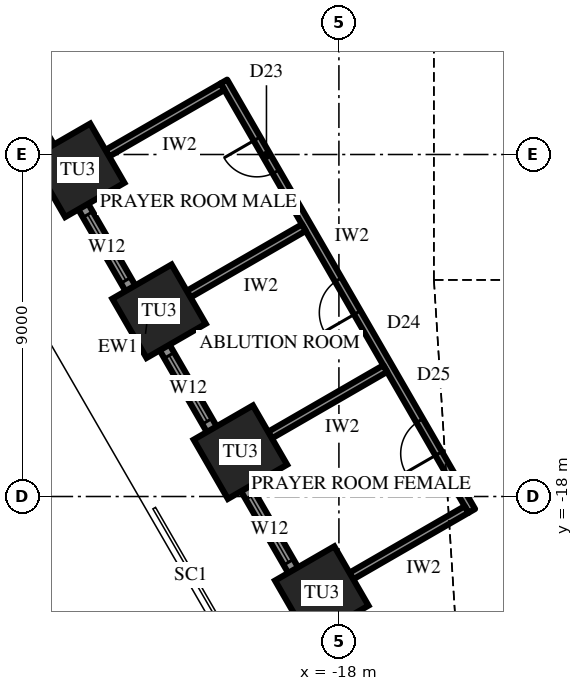
"""IFC4 building model, lengths in metres.
Left out: names, types, materials, properties, quantities, classifications, styles, units other than length and angle.
Written with IfcOpenShell. Run it as: python <this file> out.ifc"""

import sys

from ifc_helpers import new_model, si_unit, direction, frame, frame_2d, origin, origin_2d, place, context, subcontext, project, spatial, rectangle, hollow_rectangle, extrude, element, fill, save


model = new_model("IFC4")
c1 = context("Model", 3, precision=1e-05, world=origin(), true_north=direction((0.0, 1.0)))
c2 = subcontext(c1, "Body", "Model", "MODEL_VIEW")
j1 = project(units=[si_unit("LENGTHUNIT", "METRE"), si_unit("PLANEANGLEUNIT", "RADIAN")], contexts=[c1])
p1 = place(None, origin())
s1 = spatial("IfcSite", under=j1, at=p1, CompositionType="ELEMENT")
p2 = place(p1, origin())
s2 = spatial("IfcBuilding", under=s1, at=p2, CompositionType="ELEMENT")
p3 = place(p2, frame((0.0, 0.0, 311.5)))
s3 = spatial("IfcBuildingStorey", under=s2, at=p3, CompositionType="ELEMENT", Elevation=311.5)
for number, where, z_axis, x_axis in (
    (1, (-24.874, -9.417, 0.0), (0.0, 0.0, 1.0), (0.5, -0.866, 0.0)),
    (2, (-22.733, -13.125, 0.0), (0.0, 0.0, 1.0), (0.5, -0.866, 0.0)),
    (3, (-20.592, -16.833, 0.0), (0.0, 0.0, 1.0), (0.5, -0.866, 0.0)),
    (4, (-18.451, -20.542, 0.0), (0.0, 0.0, 1.0), (0.5, -0.866, 0.0)),
):
    element("IfcColumn", number, at=place(p3, frame(where, z_axis=z_axis, x_axis=x_axis)), inside=s3, PredefinedType="COLUMN", context=c2, shape_type="SweptSolid", body=[
        extrude(hollow_rectangle(XDim=1.8, YDim=1.8, WallThickness=0.1, at=origin_2d()), origin(), (0.0, 0.0, 1.0), 4.2),
    ])
p4 = place(p3, frame((-29.459, -2.175, 0.0), z_axis=(0.0, 0.0, 1.0), x_axis=(0.499997191038, -0.866027025533, 0.0)))
e5 = element("IfcWall", 5, at=p4, inside=s3, PredefinedType="SOLIDWALL", context=c2, shape_type="SweptSolid", body=[
    extrude(rectangle(XDim=25.692, YDim=0.3, at=frame_2d((12.846, 0.0))), origin(), (0.0, 0.0, 1.0), 2.0),
])
p5 = place(p4, frame((1.141, 0.0, 0.6)))
e6 = element("IfcOpeningElement", 6, at=p5, cuts=e5, PredefinedType="OPENING", context=c2, shape_type="SweptSolid", body=[
    extrude(rectangle(XDim=2.0, YDim=1.15, at=frame_2d((1.0, 0.575))), frame((0.0, 0.16, 0.0), z_axis=(0.0, -1.0, 0.0), x_axis=(1.0, 0.0, 0.0)), (0.0, 0.0, 1.0), 0.32),
])
p6 = place(p4, frame((5.423, 0.0, 0.6)))
e7 = element("IfcOpeningElement", 7, at=p6, cuts=e5, PredefinedType="OPENING", context=c2, shape_type="SweptSolid", body=[
    extrude(rectangle(XDim=2.0, YDim=1.15, at=frame_2d((1.0, 0.575))), frame((0.0, 0.16, 0.0), z_axis=(0.0, -1.0, 0.0), x_axis=(1.0, 0.0, 0.0)), (0.0, 0.0, 1.0), 0.32),
])
p7 = place(p4, frame((9.705, 0.0, 0.6)))
e8 = element("IfcOpeningElement", 8, at=p7, cuts=e5, PredefinedType="OPENING", context=c2, shape_type="SweptSolid", body=[
    extrude(rectangle(XDim=2.0, YDim=1.15, at=frame_2d((1.0, 0.575))), frame((0.0, 0.16, 0.0), z_axis=(0.0, -1.0, 0.0), x_axis=(1.0, 0.0, 0.0)), (0.0, 0.0, 1.0), 0.32),
])
p8 = place(p4, frame((13.987, 0.0, 0.6)))
e9 = element("IfcOpeningElement", 9, at=p8, cuts=e5, PredefinedType="OPENING", context=c2, shape_type="SweptSolid", body=[
    extrude(rectangle(XDim=2.0, YDim=1.15, at=frame_2d((1.0, 0.575))), frame((0.0, 0.16, 0.0), z_axis=(0.0, -1.0, 0.0), x_axis=(1.0, 0.0, 0.0)), (0.0, 0.0, 1.0), 0.32),
])
p9 = place(p4, frame((18.269, 0.0, 0.6)))
e10 = element("IfcOpeningElement", 10, at=p9, cuts=e5, PredefinedType="OPENING", context=c2, shape_type="SweptSolid", body=[
    extrude(rectangle(XDim=2.0, YDim=1.15, at=frame_2d((1.0, 0.575))), frame((0.0, 0.16, 0.0), z_axis=(0.0, -1.0, 0.0), x_axis=(1.0, 0.0, 0.0)), (0.0, 0.0, 1.0), 0.32),
])
p10 = place(p4, frame((22.551, 0.0, 0.6)))
e11 = element("IfcOpeningElement", 11, at=p10, cuts=e5, PredefinedType="OPENING", context=c2, shape_type="SweptSolid", body=[
    extrude(rectangle(XDim=2.0, YDim=1.15, at=frame_2d((1.0, 0.575))), frame((0.0, 0.16, 0.0), z_axis=(0.0, -1.0, 0.0), x_axis=(1.0, 0.0, 0.0)), (0.0, 0.0, 1.0), 0.32),
])
p11 = place(p3, frame((-21.027, -7.08, 0.0), z_axis=(0.0, 0.0, 1.0), x_axis=(0.499999460936, -0.866025715013, 0.0)))
e12 = element("IfcWall", 12, at=p11, inside=s3, PredefinedType="PARTITIONING", context=c2, shape_type="SweptSolid", body=[
    extrude(rectangle(XDim=13.046, YDim=0.2, at=frame_2d((6.523, 0.0))), origin(), (0.0, 0.0, 1.0), 4.0),
])
p12 = place(p11, frame((1.741, 0.0, 0.0)))
e13 = element("IfcOpeningElement", 13, at=p12, cuts=e12, PredefinedType="OPENING", context=c2, shape_type="SweptSolid", body=[
    extrude(rectangle(XDim=1.0, YDim=2.2, at=frame_2d((0.5, 1.1))), frame((0.0, 0.11, 0.0), z_axis=(0.0, -1.0, 0.0), x_axis=(1.0, 0.0, 0.0)), (0.0, 0.0, 1.0), 0.22),
])
p13 = place(p11, frame((6.023, 0.0, 0.0)))
e14 = element("IfcOpeningElement", 14, at=p13, cuts=e12, PredefinedType="OPENING", context=c2, shape_type="SweptSolid", body=[
    extrude(rectangle(XDim=1.0, YDim=2.2, at=frame_2d((0.5, 1.1))), frame((0.0, 0.11, 0.0), z_axis=(0.0, -1.0, 0.0), x_axis=(1.0, 0.0, 0.0)), (0.0, 0.0, 1.0), 0.22),
])
p14 = place(p11, frame((10.305, 0.0, 0.0)))
e15 = element("IfcOpeningElement", 15, at=p14, cuts=e12, PredefinedType="OPENING", context=c2, shape_type="SweptSolid", body=[
    extrude(rectangle(XDim=1.0, YDim=2.2, at=frame_2d((0.5, 1.1))), frame((0.0, 0.11, 0.0), z_axis=(0.0, -1.0, 0.0), x_axis=(1.0, 0.0, 0.0)), (0.0, 0.0, 1.0), 0.22),
])
p15 = place(p3, frame((-21.064, -7.217, 0.0), z_axis=(0.0, 0.0, 1.0), x_axis=(-0.866019471182, -0.500010275428, 0.0)))
e16 = element("IfcWall", 16, at=p15, inside=s3, PredefinedType="PARTITIONING", context=c2, shape_type="SweptSolid", body=[
    extrude(rectangle(XDim=3.5, YDim=0.2, at=frame_2d((1.75, 0.0))), origin(), (0.0, 0.0, 1.0), 2.992),
])
p16 = place(p3, frame((-18.923, -10.925, 0.0), z_axis=(0.0, 0.0, 1.0), x_axis=(-0.866036909293, -0.499980071345, 0.0)))
e17 = element("IfcWall", 17, at=p16, inside=s3, PredefinedType="PARTITIONING", context=c2, shape_type="SweptSolid", body=[
    extrude(rectangle(XDim=3.5, YDim=0.2, at=frame_2d((1.75, 0.0))), origin(), (0.0, 0.0, 1.0), 3.082),
])
for number, where, z_axis, x_axis in (
    (18, (-16.782, -14.633, 0.0), (0.0, 0.0, 1.0), (-0.866, -0.5, 0.0)),
    (19, (-14.641, -18.342, 0.0), (0.0, 0.0, 1.0), (-0.866, -0.5, 0.0)),
):
    element("IfcWall", number, at=place(p3, frame(where, z_axis=z_axis, x_axis=x_axis)), inside=s3, PredefinedType="PARTITIONING", context=c2, shape_type="SweptSolid", body=[
        extrude(rectangle(XDim=3.5, YDim=0.2, at=frame_2d((1.75, 0.0))), origin(), (0.0, 0.0, 1.0), 3.082),
    ])
p17 = place(p7, origin())
e20 = element("IfcWindow", 20, at=p17, inside=s3, PartitioningType="SINGLE_PANEL", PredefinedType="WINDOW", context=c2, shape_type="SweptSolid", body=[
    extrude(rectangle(XDim=2.0, YDim=1.15, at=frame_2d((1.0, 0.575))), frame((0.0, 0.03, 0.0), z_axis=(0.0, -1.0, 0.0), x_axis=(1.0, 0.0, 0.0)), (0.0, 0.0, 1.0), 0.06),
])
fill(e8, e20)
p18 = place(p8, origin())
e21 = element("IfcWindow", 21, at=p18, inside=s3, PartitioningType="SINGLE_PANEL", PredefinedType="WINDOW", context=c2, shape_type="SweptSolid", body=[
    extrude(rectangle(XDim=2.0, YDim=1.15, at=frame_2d((1.0, 0.575))), frame((0.0, 0.03, 0.0), z_axis=(0.0, -1.0, 0.0), x_axis=(1.0, 0.0, 0.0)), (0.0, 0.0, 1.0), 0.06),
])
fill(e9, e21)
p19 = place(p9, origin())
e22 = element("IfcWindow", 22, at=p19, inside=s3, PartitioningType="SINGLE_PANEL", PredefinedType="WINDOW", context=c2, shape_type="SweptSolid", body=[
    extrude(rectangle(XDim=2.0, YDim=1.15, at=frame_2d((1.0, 0.575))), frame((0.0, 0.03, 0.0), z_axis=(0.0, -1.0, 0.0), x_axis=(1.0, 0.0, 0.0)), (0.0, 0.0, 1.0), 0.06),
])
fill(e10, e22)
p20 = place(p12, frame((1.0, 0.0, 0.0), z_axis=(0.0, 0.0, 1.0), x_axis=(-1.0, 0.0, 0.0)))
e23 = element("IfcDoor", 23, at=p20, inside=s3, OperationType="SINGLE_SWING_LEFT", PredefinedType="DOOR", context=c2, shape_type="SweptSolid", body=[
    extrude(rectangle(XDim=1.0, YDim=2.2, at=frame_2d((0.5, 1.1))), frame((0.0, 0.025, 0.0), z_axis=(0.0, -1.0, 0.0), x_axis=(1.0, 0.0, 0.0)), (0.0, 0.0, 1.0), 0.05),
])
fill(e13, e23)
p21 = place(p13, frame((1.0, 0.0, 0.0), z_axis=(0.0, 0.0, 1.0), x_axis=(-1.0, 0.0, 0.0)))
e24 = element("IfcDoor", 24, at=p21, inside=s3, OperationType="SINGLE_SWING_RIGHT", PredefinedType="DOOR", context=c2, shape_type="SweptSolid", body=[
    extrude(rectangle(XDim=1.0, YDim=2.2, at=frame_2d((0.5, 1.1))), frame((0.0, 0.025, 0.0), z_axis=(0.0, -1.0, 0.0), x_axis=(1.0, 0.0, 0.0)), (0.0, 0.0, 1.0), 0.05),
])
fill(e14, e24)
p22 = place(p14, frame((1.0, 0.0, 0.0), z_axis=(0.0, 0.0, 1.0), x_axis=(-1.0, 0.0, 0.0)))
e25 = element("IfcDoor", 25, at=p22, inside=s3, OperationType="SINGLE_SWING_RIGHT", PredefinedType="DOOR", context=c2, shape_type="SweptSolid", body=[
    extrude(rectangle(XDim=1.0, YDim=2.2, at=frame_2d((0.5, 1.1))), frame((0.0, 0.025, 0.0), z_axis=(0.0, -1.0, 0.0), x_axis=(1.0, 0.0, 0.0)), (0.0, 0.0, 1.0), 0.05),
])
fill(e15, e25)
save(model, sys.argv[1])
